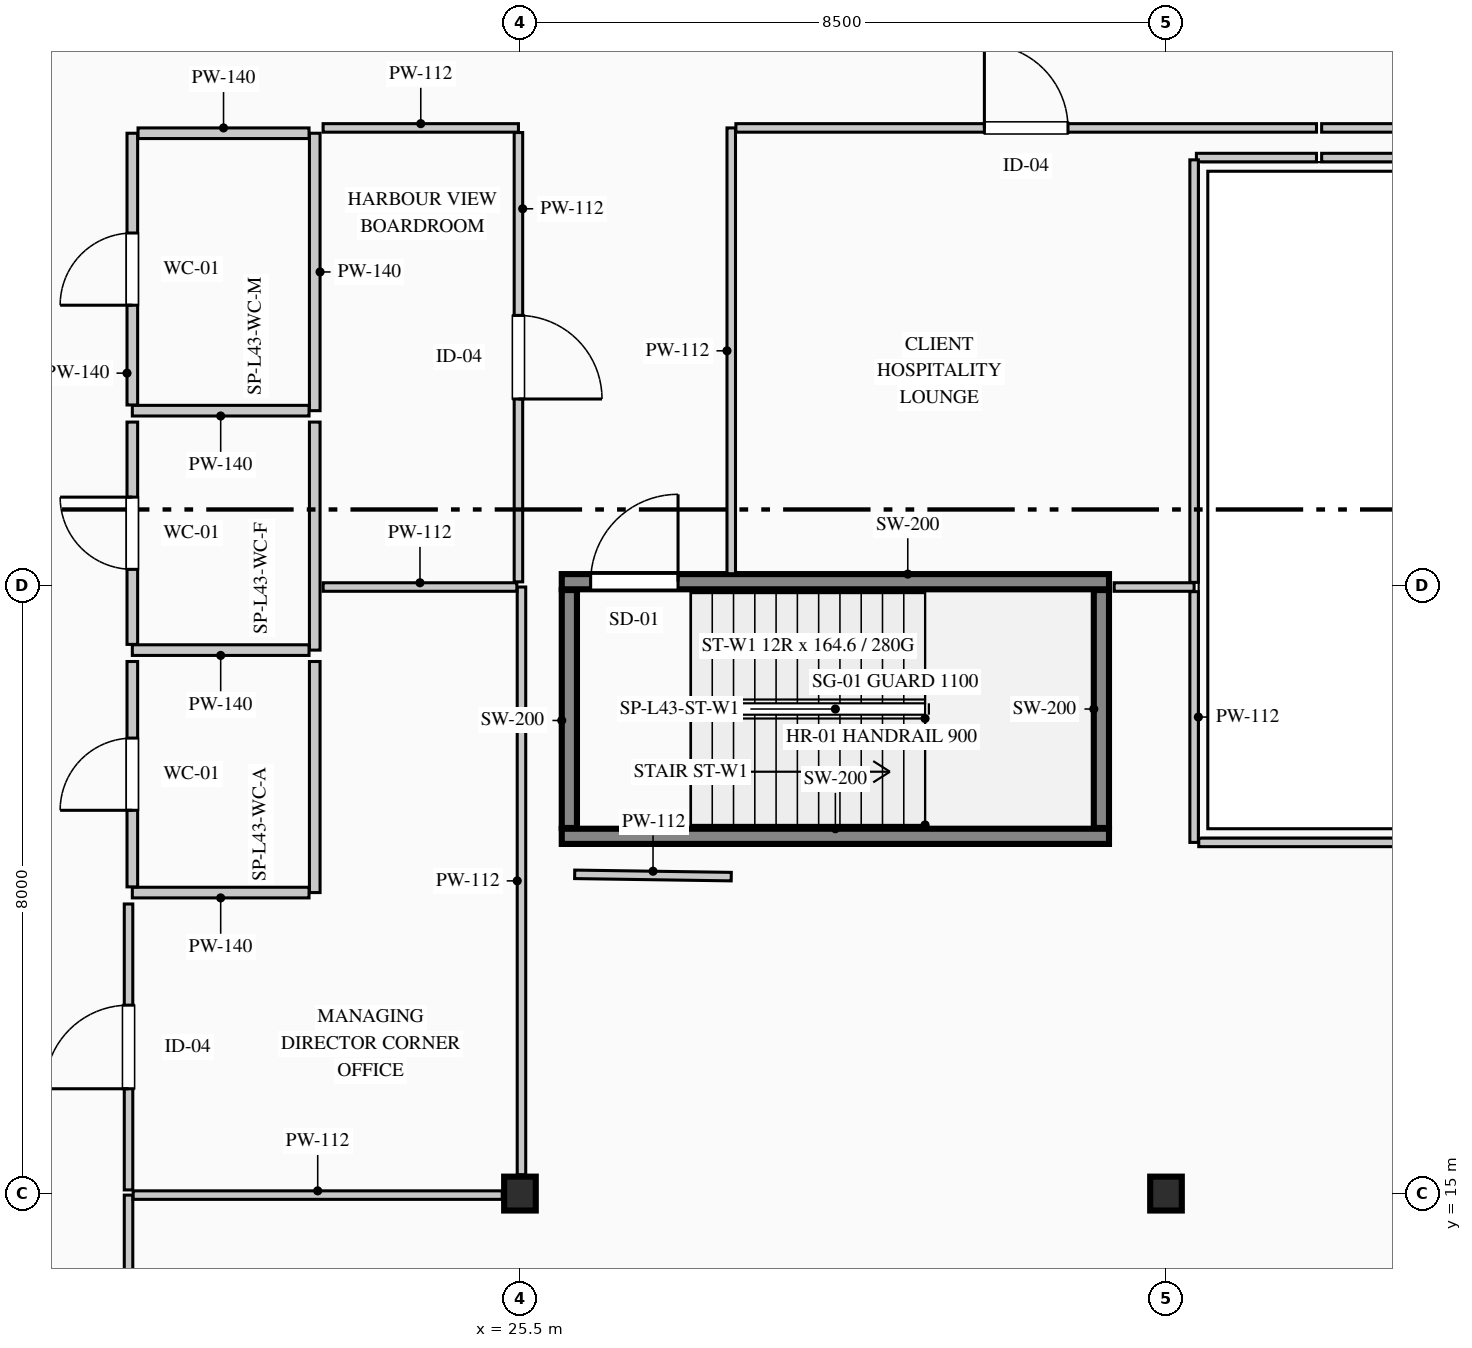
"""IFC4 building model, lengths in metres.
Left out: names, types, materials, properties, quantities, classifications, styles, units other than length and angle.
Written with IfcOpenShell. Run it as: python <this file> out.ifc"""

import sys

from ifc_helpers import new_model, si_unit, direction, frame, frame_2d, origin, origin_2d, place, context, subcontext, project, spatial, rectangle, i_section, extrude, element, fill, save


model = new_model("IFC4")
c1 = context("Model", 3, precision=1e-05, world=origin(), true_north=direction((0.0, 1.0)))
c2 = subcontext(c1, "Body", "Model", "MODEL_VIEW")
j1 = project(units=[si_unit("LENGTHUNIT", "METRE"), si_unit("PLANEANGLEUNIT", "RADIAN")], contexts=[c1])
p1 = place(None, origin())
s1 = spatial("IfcSite", under=j1, at=p1, CompositionType="ELEMENT")
p2 = place(p1, origin())
s2 = spatial("IfcBuilding", under=s1, at=p2, CompositionType="ELEMENT")
p3 = place(p2, frame((0.0, 0.0, 183.75)))
s3 = spatial("IfcBuildingStorey", under=s2, at=p3, CompositionType="ELEMENT", Elevation=183.75)
p4 = place(p3, frame((26.05, 19.7, 0.0), z_axis=(0.0, 0.0, 1.0), x_axis=(1.0, 0.0, 0.0)))
e1 = element("IfcWall", 1, at=p4, inside=s3, PredefinedType="SHEAR", context=c2, shape_type="SweptSolid", body=[
    extrude(rectangle(XDim=7.2, YDim=0.2, at=frame_2d((3.6, 0.0))), origin(), (0.0, 0.0, 1.0), 3.95),
])
p5 = place(p3, frame((26.05, 23.05, 0.0), z_axis=(0.0, 0.0, 1.0), x_axis=(1.0, 0.0, 0.0)))
e2 = element("IfcWall", 2, at=p5, inside=s3, PredefinedType="SHEAR", context=c2, shape_type="SweptSolid", body=[
    extrude(rectangle(XDim=7.2, YDim=0.2, at=frame_2d((3.6, 0.0))), origin(), (0.0, 0.0, 1.0), 3.95),
])
p6 = place(p5, frame((0.38, 0.0, 0.0)))
e3 = element("IfcOpeningElement", 3, at=p6, cuts=e2, PredefinedType="OPENING", context=c2, shape_type="SweptSolid", body=[
    extrude(rectangle(XDim=1.15, YDim=2.2, at=frame_2d((0.575, 1.1))), frame((0.0, 0.11, 0.0), z_axis=(0.0, -1.0, 0.0), x_axis=(1.0, 0.0, 0.0)), (0.0, 0.0, 1.0), 0.22),
])
for number, where, z_axis, x_axis in (
    (4, (26.15, 19.81, 0.0), (0.0, 0.0, 1.0), (0.0, 1.0, 0.0)),
    (5, (33.15, 19.81, 0.0), (0.0, 0.0, 1.0), (0.0, 1.0, 0.0)),
):
    element("IfcWall", number, at=place(p3, frame(where, z_axis=z_axis, x_axis=x_axis)), inside=s3, PredefinedType="SHEAR", context=c2, shape_type="SweptSolid", body=[
        extrude(rectangle(XDim=3.13, YDim=0.2, at=frame_2d((1.565, 0.0))), origin(), (0.0, 0.0, 1.0), 3.95),
    ])
for number, where, z_axis, x_axis in (
    (6, (25.5, 15.0, 0.0), (0.0, 0.0, 1.0), (1.0, 0.0, 0.0)),
    (7, (34.0, 15.0, 0.0), (0.0, 0.0, 1.0), (1.0, 0.0, 0.0)),
):
    element("IfcColumn", number, at=place(p3, frame(where, z_axis=z_axis, x_axis=x_axis)), inside=s3, PredefinedType="COLUMN", context=c2, shape_type="SweptSolid", body=[
        extrude(i_section(OverallWidth=0.416, OverallDepth=0.446, WebThickness=0.039, FlangeThickness=0.063, FilletRadius=0.015, at=origin_2d()), origin(), (0.0, 0.0, 1.0), 3.95),
    ])
p7 = place(p3, frame((22.8, 28.95, 0.0), z_axis=(0.0, 0.0, 1.0), x_axis=(0.0, -1.0, 0.0)))
e8 = element("IfcWall", 8, at=p7, inside=s3, PredefinedType="PARTITIONING", context=c2, shape_type="SweptSolid", body=[
    extrude(rectangle(XDim=3.65, YDim=0.14, at=frame_2d((1.825, 0.0))), origin(), (0.0, 0.0, 1.0), 3.385),
])
p8 = place(p3, frame((22.725, 25.3, 0.0), z_axis=(0.0, 0.0, 1.0), x_axis=(-1.0, 0.0, 0.0)))
e9 = element("IfcWall", 9, at=p8, inside=s3, PredefinedType="PARTITIONING", context=c2, shape_type="SweptSolid", body=[
    extrude(rectangle(XDim=2.325, YDim=0.14, at=frame_2d((1.163, 0.0))), origin(), (0.0, 0.0, 1.0), 3.7),
])
p9 = place(p3, frame((20.4, 25.375, 0.0), z_axis=(0.0, 0.0, 1.0), x_axis=(0.0, 1.0, 0.0)))
e10 = element("IfcWall", 10, at=p9, inside=s3, PredefinedType="PARTITIONING", context=c2, shape_type="SweptSolid", body=[
    extrude(rectangle(XDim=3.575, YDim=0.14, at=frame_2d((1.788, 0.0))), origin(), (0.0, 0.0, 1.0), 3.7),
])
p10 = place(p9, frame((1.312, 0.0, 0.0)))
e11 = element("IfcOpeningElement", 11, at=p10, cuts=e10, PredefinedType="OPENING", context=c2, shape_type="SweptSolid", body=[
    extrude(rectangle(XDim=0.95, YDim=2.15, at=frame_2d((0.475, 1.075))), frame((0.0, 0.08, 0.0), z_axis=(0.0, -1.0, 0.0), x_axis=(1.0, 0.0, 0.0)), (0.0, 0.0, 1.0), 0.16),
])
p11 = place(p3, frame((20.475, 28.95, 0.0), z_axis=(0.0, 0.0, 1.0), x_axis=(1.0, 0.0, 0.0)))
e12 = element("IfcWall", 12, at=p11, inside=s3, PredefinedType="PARTITIONING", context=c2, shape_type="SweptSolid", body=[
    extrude(rectangle(XDim=2.25, YDim=0.14, at=frame_2d((1.125, 0.0))), origin(), (0.0, 0.0, 1.0), 3.7),
])
p12 = place(p3, frame((22.8, 25.15, 0.0), z_axis=(0.0, 0.0, 1.0), x_axis=(0.0, -1.0, 0.0)))
e13 = element("IfcWall", 13, at=p12, inside=s3, PredefinedType="PARTITIONING", context=c2, shape_type="SweptSolid", body=[
    extrude(rectangle(XDim=3.0, YDim=0.14, at=frame_2d((1.5, 0.0))), origin(), (0.0, 0.0, 1.0), 3.385),
])
p13 = place(p3, frame((22.725, 22.15, 0.0), z_axis=(0.0, 0.0, 1.0), x_axis=(-1.0, 0.0, 0.0)))
e14 = element("IfcWall", 14, at=p13, inside=s3, PredefinedType="PARTITIONING", context=c2, shape_type="SweptSolid", body=[
    extrude(rectangle(XDim=2.325, YDim=0.14, at=frame_2d((1.163, 0.0))), origin(), (0.0, 0.0, 1.0), 3.7),
])
p14 = place(p3, frame((20.4, 22.225, 0.0), z_axis=(0.0, 0.0, 1.0), x_axis=(0.0, 1.0, 0.0)))
e15 = element("IfcWall", 15, at=p14, inside=s3, PredefinedType="PARTITIONING", context=c2, shape_type="SweptSolid", body=[
    extrude(rectangle(XDim=2.925, YDim=0.14, at=frame_2d((1.462, 0.0))), origin(), (0.0, 0.0, 1.0), 3.7),
])
p15 = place(p14, frame((0.988, 0.0, 0.0)))
e16 = element("IfcOpeningElement", 16, at=p15, cuts=e15, PredefinedType="OPENING", context=c2, shape_type="SweptSolid", body=[
    extrude(rectangle(XDim=0.95, YDim=2.15, at=frame_2d((0.475, 1.075))), frame((0.0, 0.08, 0.0), z_axis=(0.0, -1.0, 0.0), x_axis=(1.0, 0.0, 0.0)), (0.0, 0.0, 1.0), 0.16),
])
p16 = place(p3, frame((22.8, 22.0, 0.0), z_axis=(0.0, 0.0, 1.0), x_axis=(0.0, -1.0, 0.0)))
e17 = element("IfcWall", 17, at=p16, inside=s3, PredefinedType="PARTITIONING", context=c2, shape_type="SweptSolid", body=[
    extrude(rectangle(XDim=3.04, YDim=0.14, at=frame_2d((1.52, 0.0))), origin(), (0.0, 0.0, 1.0), 3.385),
])
p17 = place(p3, frame((22.725, 18.96, 0.0), z_axis=(0.0, 0.0, 1.0), x_axis=(-1.0, 0.0, 0.0)))
e18 = element("IfcWall", 18, at=p17, inside=s3, PredefinedType="PARTITIONING", context=c2, shape_type="SweptSolid", body=[
    extrude(rectangle(XDim=2.325, YDim=0.14, at=frame_2d((1.163, 0.0))), origin(), (0.0, 0.0, 1.0), 3.7),
])
p18 = place(p3, frame((20.4, 19.035, 0.0), z_axis=(0.0, 0.0, 1.0), x_axis=(0.0, 1.0, 0.0)))
e19 = element("IfcWall", 19, at=p18, inside=s3, PredefinedType="PARTITIONING", context=c2, shape_type="SweptSolid", body=[
    extrude(rectangle(XDim=2.965, YDim=0.14, at=frame_2d((1.482, 0.0))), origin(), (0.0, 0.0, 1.0), 3.7),
])
p19 = place(p18, frame((1.008, 0.0, 0.0)))
e20 = element("IfcOpeningElement", 20, at=p19, cuts=e19, PredefinedType="OPENING", context=c2, shape_type="SweptSolid", body=[
    extrude(rectangle(XDim=0.95, YDim=2.15, at=frame_2d((0.475, 1.075))), frame((0.0, 0.08, 0.0), z_axis=(0.0, -1.0, 0.0), x_axis=(1.0, 0.0, 0.0)), (0.0, 0.0, 1.0), 0.16),
])
p20 = place(p3, frame((33.318, 22.98, 0.0), z_axis=(0.0, 0.0, 1.0), x_axis=(1.0, 0.0, 0.0)))
e21 = element("IfcWall", 21, at=p20, inside=s3, PredefinedType="PARTITIONING", context=c2, shape_type="SweptSolid", body=[
    extrude(rectangle(XDim=1.052, YDim=0.112, at=frame_2d((0.526, 0.0))), origin(), (0.0, 0.0, 1.0), 3.7),
])
p21 = place(p3, frame((34.37, 22.919, 0.0), z_axis=(0.0, 0.0, 1.0), x_axis=(0.0, -1.0, 0.0)))
e22 = element("IfcWall", 22, at=p21, inside=s3, PredefinedType="PARTITIONING", context=c2, shape_type="SweptSolid", body=[
    extrude(rectangle(XDim=3.299, YDim=0.112, at=frame_2d((1.649, 0.0))), origin(), (0.0, 0.0, 1.0), 3.7),
])
p22 = place(p3, frame((34.431, 19.62, 0.0), z_axis=(0.0, 0.0, 1.0), x_axis=(1.0, 0.0, 0.0)))
e23 = element("IfcWall", 23, at=p22, inside=s3, PredefinedType="PARTITIONING", context=c2, shape_type="SweptSolid", body=[
    extrude(rectangle(XDim=8.726, YDim=0.112, at=frame_2d((4.363, 0.0))), origin(), (0.0, 0.0, 1.0), 3.7),
])
p23 = place(p3, frame((20.35, 11.831, 0.0), z_axis=(0.0, 0.0, 1.0), x_axis=(0.0, 1.0, 0.0)))
e24 = element("IfcWall", 24, at=p23, inside=s3, PredefinedType="PARTITIONING", context=c2, shape_type="SweptSolid", body=[
    extrude(rectangle(XDim=3.149, YDim=0.112, at=frame_2d((1.574, 0.0))), origin(), (0.0, 0.0, 1.0), 3.7),
])
p24 = place(p3, frame((20.411, 14.98, 0.0), z_axis=(0.0, 0.0, 1.0), x_axis=(1.0, 0.0, 0.0)))
e25 = element("IfcWall", 25, at=p24, inside=s3, PredefinedType="PARTITIONING", context=c2, shape_type="SweptSolid", body=[
    extrude(rectangle(XDim=4.856, YDim=0.112, at=frame_2d((2.428, 0.0))), origin(), (0.0, 0.0, 1.0), 3.085),
])
p25 = place(p3, frame((25.52, 15.248, 0.0), z_axis=(0.0, 0.0, 1.0), x_axis=(0.0, 1.0, 0.0)))
e26 = element("IfcWall", 26, at=p25, inside=s3, PredefinedType="PARTITIONING", context=c2, shape_type="SweptSolid", body=[
    extrude(rectangle(XDim=7.732, YDim=0.112, at=frame_2d((3.866, 0.0))), origin(), (0.0, 0.0, 1.0), 2.885),
])
p26 = place(p3, frame((26.22, 19.2, 0.0), z_axis=(0.0, 0.0, 1.0), x_axis=(0.999893773718, -0.014575365509, 0.0)))
e27 = element("IfcWall", 27, at=p26, inside=s3, PredefinedType="PARTITIONING", context=c2, shape_type="SweptSolid", body=[
    extrude(rectangle(XDim=2.06, YDim=0.112, at=frame_2d((1.03, 0.0))), origin(), (0.0, 0.0, 1.0), 3.385),
])
p27 = place(p3, frame((22.91, 22.98, 0.0), z_axis=(0.0, 0.0, 1.0), x_axis=(1.0, 0.0, 0.0)))
e28 = element("IfcWall", 28, at=p27, inside=s3, PredefinedType="PARTITIONING", context=c2, shape_type="SweptSolid", body=[
    extrude(rectangle(XDim=2.549, YDim=0.112, at=frame_2d((1.274, 0.0))), origin(), (0.0, 0.0, 1.0), 3.7),
])
p28 = place(p3, frame((20.35, 15.048, 0.0), z_axis=(0.0, 0.0, 1.0), x_axis=(0.0, 1.0, 0.0)))
e29 = element("IfcWall", 29, at=p28, inside=s3, PredefinedType="PARTITIONING", context=c2, shape_type="SweptSolid", body=[
    extrude(rectangle(XDim=3.762, YDim=0.112, at=frame_2d((1.881, 0.0))), origin(), (0.0, 0.0, 1.0), 3.7),
])
p29 = place(p28, frame((1.331, 0.0, 0.0)))
e30 = element("IfcOpeningElement", 30, at=p29, cuts=e29, PredefinedType="OPENING", context=c2, shape_type="SweptSolid", body=[
    extrude(rectangle(XDim=1.1, YDim=2.2, at=frame_2d((0.55, 1.1))), frame((0.0, 0.066, 0.0), z_axis=(0.0, -1.0, 0.0), x_axis=(1.0, 0.0, 0.0)), (0.0, 0.0, 1.0), 0.132),
])
p30 = place(p3, frame((22.91, 29.02, 0.0), z_axis=(0.0, 0.0, 1.0), x_axis=(1.0, 0.0, 0.0)))
e31 = element("IfcWall", 31, at=p30, inside=s3, PredefinedType="PARTITIONING", context=c2, shape_type="SweptSolid", body=[
    extrude(rectangle(XDim=2.57, YDim=0.112, at=frame_2d((1.285, 0.0))), origin(), (0.0, 0.0, 1.0), 3.7),
])
p31 = place(p3, frame((25.48, 28.959, 0.0), z_axis=(0.0, 0.0, 1.0), x_axis=(0.0, -1.0, 0.0)))
e32 = element("IfcWall", 32, at=p31, inside=s3, PredefinedType="PARTITIONING", context=c2, shape_type="SweptSolid", body=[
    extrude(rectangle(XDim=5.911, YDim=0.112, at=frame_2d((2.956, 0.0))), origin(), (0.0, 0.0, 1.0), 2.885),
])
p32 = place(p31, frame((2.406, 0.0, 0.0)))
e33 = element("IfcOpeningElement", 33, at=p32, cuts=e32, PredefinedType="OPENING", context=c2, shape_type="SweptSolid", body=[
    extrude(rectangle(XDim=1.1, YDim=2.2, at=frame_2d((0.55, 1.1))), frame((0.0, 0.066, 0.0), z_axis=(0.0, -1.0, 0.0), x_axis=(1.0, 0.0, 0.0)), (0.0, 0.0, 1.0), 0.132),
])
p33 = place(p3, frame((28.28, 23.155, 0.0), z_axis=(0.0, 0.0, 1.0), x_axis=(0.0, 1.0, 0.0)))
e34 = element("IfcWall", 34, at=p33, inside=s3, PredefinedType="PARTITIONING", context=c2, shape_type="SweptSolid", body=[
    extrude(rectangle(XDim=5.865, YDim=0.112, at=frame_2d((2.933, 0.0))), origin(), (0.0, 0.0, 1.0), 3.7),
])
p34 = place(p3, frame((28.341, 29.02, 0.0), z_axis=(0.0, 0.0, 1.0), x_axis=(1.0, 0.0, 0.0)))
e35 = element("IfcWall", 35, at=p34, inside=s3, PredefinedType="PARTITIONING", context=c2, shape_type="SweptSolid", body=[
    extrude(rectangle(XDim=7.639, YDim=0.112, at=frame_2d((3.819, 0.0))), origin(), (0.0, 0.0, 1.0), 3.385),
])
p35 = place(p34, frame((3.27, 0.0, 0.0)))
e36 = element("IfcOpeningElement", 36, at=p35, cuts=e35, PredefinedType="OPENING", context=c2, shape_type="SweptSolid", body=[
    extrude(rectangle(XDim=1.1, YDim=2.2, at=frame_2d((0.55, 1.1))), frame((0.0, 0.066, 0.0), z_axis=(0.0, -1.0, 0.0), x_axis=(1.0, 0.0, 0.0)), (0.0, 0.0, 1.0), 0.132),
])
p36 = place(p3, frame((35.98, 28.63, 0.0), z_axis=(0.0, 0.0, 1.0), x_axis=(-1.0, 0.0, 0.0)))
e37 = element("IfcWall", 37, at=p36, inside=s3, PredefinedType="PARTITIONING", context=c2, shape_type="SweptSolid", body=[
    extrude(rectangle(XDim=1.58, YDim=0.112, at=frame_2d((0.79, 0.0))), origin(), (0.0, 0.0, 1.0), 3.7),
])
p37 = place(p3, frame((34.37, 28.6, 0.0), z_axis=(0.0, 0.0, 1.0), x_axis=(0.0, -1.0, 0.0)))
e38 = element("IfcWall", 38, at=p37, inside=s3, PredefinedType="PARTITIONING", context=c2, shape_type="SweptSolid", body=[
    extrude(rectangle(XDim=5.559, YDim=0.112, at=frame_2d((2.78, 0.0))), origin(), (0.0, 0.0, 1.0), 3.7),
])
p38 = place(p3, frame((42.3, 28.63, 0.0), z_axis=(0.0, 0.0, 1.0), x_axis=(-1.0, 0.0, 0.0)))
e39 = element("IfcWall", 39, at=p38, inside=s3, PredefinedType="PARTITIONING", context=c2, shape_type="SweptSolid", body=[
    extrude(rectangle(XDim=6.252, YDim=0.112, at=frame_2d((3.126, 0.0))), origin(), (0.0, 0.0, 1.0), 3.7),
])
p39 = place(p3, frame((36.048, 29.02, 0.0), z_axis=(0.0, 0.0, 1.0), x_axis=(1.0, 0.0, 0.0)))
e40 = element("IfcWall", 40, at=p39, inside=s3, PredefinedType="PARTITIONING", context=c2, shape_type="SweptSolid", body=[
    extrude(rectangle(XDim=3.402, YDim=0.112, at=frame_2d((1.701, 0.0))), origin(), (0.0, 0.0, 1.0), 3.7),
])
p40 = place(p6, origin())
e41 = element("IfcDoor", 41, at=p40, inside=s3, OperationType="SINGLE_SWING_RIGHT", PredefinedType="DOOR", context=c2, shape_type="SweptSolid", body=[
    extrude(rectangle(XDim=1.15, YDim=2.2, at=frame_2d((0.575, 1.1))), frame((0.0, 0.025, 0.0), z_axis=(0.0, -1.0, 0.0), x_axis=(1.0, 0.0, 0.0)), (0.0, 0.0, 1.0), 0.05),
])
fill(e3, e41)
p41 = place(p10, origin())
e42 = element("IfcDoor", 42, at=p41, inside=s3, OperationType="SINGLE_SWING_LEFT", PredefinedType="DOOR", context=c2, shape_type="SweptSolid", body=[
    extrude(rectangle(XDim=0.95, YDim=2.15, at=frame_2d((0.475, 1.075))), frame((0.0, 0.025, 0.0), z_axis=(0.0, -1.0, 0.0), x_axis=(1.0, 0.0, 0.0)), (0.0, 0.0, 1.0), 0.05),
])
fill(e11, e42)
p42 = place(p15, origin())
e43 = element("IfcDoor", 43, at=p42, inside=s3, OperationType="SINGLE_SWING_RIGHT", PredefinedType="DOOR", context=c2, shape_type="SweptSolid", body=[
    extrude(rectangle(XDim=0.95, YDim=2.15, at=frame_2d((0.475, 1.075))), frame((0.0, 0.025, 0.0), z_axis=(0.0, -1.0, 0.0), x_axis=(1.0, 0.0, 0.0)), (0.0, 0.0, 1.0), 0.05),
])
fill(e16, e43)
p43 = place(p19, origin())
e44 = element("IfcDoor", 44, at=p43, inside=s3, OperationType="SINGLE_SWING_LEFT", PredefinedType="DOOR", context=c2, shape_type="SweptSolid", body=[
    extrude(rectangle(XDim=0.95, YDim=2.15, at=frame_2d((0.475, 1.075))), frame((0.0, 0.025, 0.0), z_axis=(0.0, -1.0, 0.0), x_axis=(1.0, 0.0, 0.0)), (0.0, 0.0, 1.0), 0.05),
])
fill(e20, e44)
p44 = place(p29, origin())
e45 = element("IfcDoor", 45, at=p44, inside=s3, OperationType="SINGLE_SWING_LEFT", PredefinedType="DOOR", context=c2, shape_type="SweptSolid", body=[
    extrude(rectangle(XDim=1.1, YDim=2.2, at=frame_2d((0.55, 1.1))), frame((0.0, 0.025, 0.0), z_axis=(0.0, -1.0, 0.0), x_axis=(1.0, 0.0, 0.0)), (0.0, 0.0, 1.0), 0.05),
])
fill(e30, e45)
p45 = place(p32, origin())
e46 = element("IfcDoor", 46, at=p45, inside=s3, OperationType="SINGLE_SWING_RIGHT", PredefinedType="DOOR", context=c2, shape_type="SweptSolid", body=[
    extrude(rectangle(XDim=1.1, YDim=2.2, at=frame_2d((0.55, 1.1))), frame((0.0, 0.025, 0.0), z_axis=(0.0, -1.0, 0.0), x_axis=(1.0, 0.0, 0.0)), (0.0, 0.0, 1.0), 0.05),
])
fill(e33, e46)
p46 = place(p35, origin())
e47 = element("IfcDoor", 47, at=p46, inside=s3, OperationType="SINGLE_SWING_LEFT", PredefinedType="DOOR", context=c2, shape_type="SweptSolid", body=[
    extrude(rectangle(XDim=1.1, YDim=2.2, at=frame_2d((0.55, 1.1))), frame((0.0, 0.025, 0.0), z_axis=(0.0, -1.0, 0.0), x_axis=(1.0, 0.0, 0.0)), (0.0, 0.0, 1.0), 0.05),
])
fill(e36, e47)
save(model, sys.argv[1])
